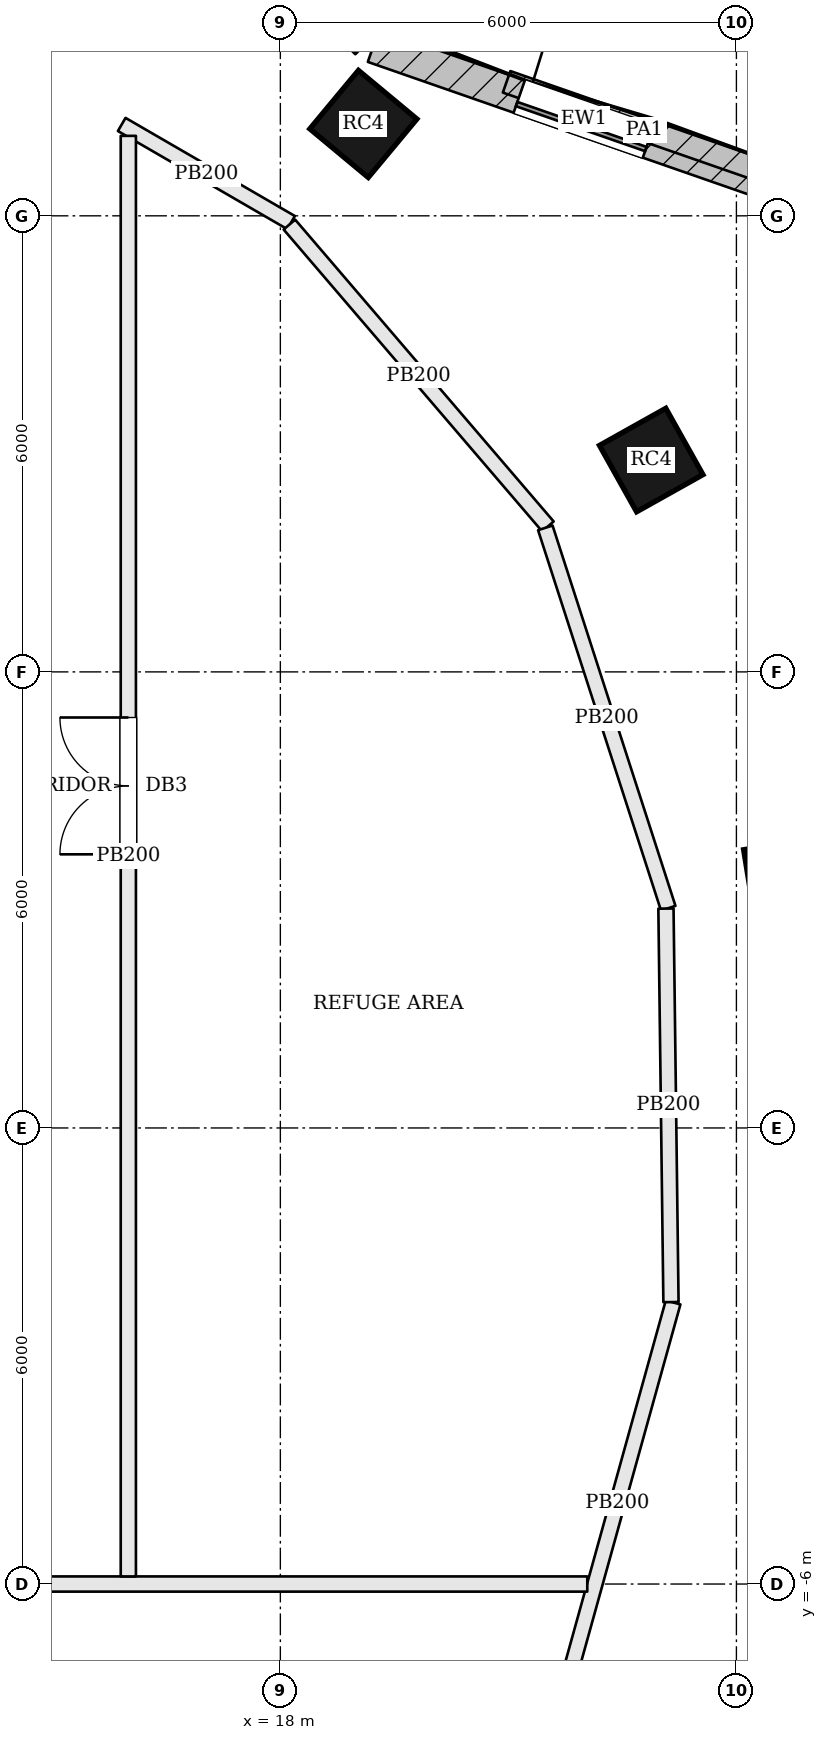
"""IFC4 building model, lengths in metres.
Left out: names, types, materials, properties, quantities, classifications, styles, units other than length and angle.
Written with IfcOpenShell. Run it as: python <this file> out.ifc"""

import sys

from ifc_helpers import new_model, si_unit, direction, frame, frame_2d, origin, origin_2d, place, context, subcontext, project, spatial, rectangle, extrude, element, fill, save


model = new_model("IFC4")
c1 = context("Model", 3, precision=1e-05, world=origin(), true_north=direction((0.0, 1.0)))
c2 = subcontext(c1, "Body", "Model", "MODEL_VIEW")
j1 = project(units=[si_unit("LENGTHUNIT", "METRE"), si_unit("PLANEANGLEUNIT", "RADIAN")], contexts=[c1])
p1 = place(None, origin())
s1 = spatial("IfcSite", under=j1, at=p1, CompositionType="ELEMENT")
p2 = place(p1, origin())
s2 = spatial("IfcBuilding", under=s1, at=p2, CompositionType="ELEMENT")
p3 = place(p2, frame((0.0, 0.0, 240.9)))
s3 = spatial("IfcBuildingStorey", under=s2, at=p3, CompositionType="ELEMENT", Elevation=240.9)
for number, where, z_axis, x_axis in (
    (1, (24.669, 3.248, 0.0), (0.0, 0.0, 1.0), (-0.162, 0.987, 0.0)),
    (2, (22.879, 8.787, 0.0), (0.0, 0.0, 1.0), (-0.489, 0.873, 0.0)),
    (3, (19.092, 13.209, 0.0), (0.0, 0.0, 1.0), (-0.769, 0.639, 0.0)),
):
    element("IfcColumn", number, at=place(p3, frame(where, z_axis=z_axis, x_axis=x_axis)), inside=s3, PredefinedType="COLUMN", context=c2, shape_type="SweptSolid", body=[
        extrude(rectangle(XDim=1.0, YDim=1.0, at=origin_2d()), origin(), (0.0, 0.0, 1.0), 3.9),
    ])
p4 = place(p3, frame((24.761, 12.31, 0.0), z_axis=(0.0, 0.0, 1.0), x_axis=(-0.944397305248, 0.328806523414, 0.0)))
e4 = element("IfcWall", 4, at=p4, inside=s3, PredefinedType="SOLIDWALL", context=c2, shape_type="SweptSolid", body=[
    extrude(rectangle(XDim=5.862, YDim=0.45, at=frame_2d((2.931, 0.0))), origin(), (0.0, 0.0, 1.0), 3.7),
])
p5 = place(p4, frame((2.031, 0.0, 0.9)))
e5 = element("IfcOpeningElement", 5, at=p5, cuts=e4, PredefinedType="OPENING", context=c2, shape_type="SweptSolid", body=[
    extrude(rectangle(XDim=1.8, YDim=2.3, at=frame_2d((0.9, 1.15))), frame((0.0, 0.235, 0.0), z_axis=(0.0, -1.0, 0.0), x_axis=(1.0, 0.0, 0.0)), (0.0, 0.0, 1.0), 0.47),
])
p6 = place(p3, frame((19.145, 14.285, 0.0), z_axis=(0.0, 0.0, 1.0), x_axis=(-0.707427521052, 0.706785895769, 0.0)))
e6 = element("IfcWall", 6, at=p6, inside=s3, PredefinedType="SOLIDWALL", context=c2, shape_type="SweptSolid", body=[
    extrude(rectangle(XDim=3.425, YDim=0.45, at=frame_2d((1.712, 0.0))), origin(), (0.0, 0.0, 1.0), 3.7),
])
p7 = place(p6, frame((0.662, 0.0, 0.9)))
e7 = element("IfcOpeningElement", 7, at=p7, cuts=e6, PredefinedType="OPENING", context=c2, shape_type="SweptSolid", body=[
    extrude(rectangle(XDim=2.1, YDim=2.3, at=frame_2d((1.05, 1.15))), frame((0.0, 0.235, 0.0), z_axis=(0.0, -1.0, 0.0), x_axis=(1.0, 0.0, 0.0)), (0.0, 0.0, 1.0), 0.47),
])
p8 = place(p3, frame((24.605, 12.5, 3.9), z_axis=(0.0, 0.0, 1.0), x_axis=(-0.944373295981, 0.328875474668, 0.0)))
e8 = element("IfcWall", 8, at=p8, inside=s3, PredefinedType="PARAPET", context=c2, shape_type="SweptSolid", body=[
    extrude(rectangle(XDim=3.842, YDim=0.3, at=frame_2d((1.921, 0.0))), origin(), (0.0, 0.0, 1.0), 1.1),
])
p9 = place(p3, frame((23.167, -2.295, 0.0), z_axis=(0.0, 0.0, 1.0), x_axis=(-0.267604764515, -0.963528769684, 0.0)))
e9 = element("IfcWall", 9, at=p9, inside=s3, PredefinedType="PARTITIONING", context=c2, shape_type="SweptSolid", body=[
    extrude(rectangle(XDim=5.475, YDim=0.2, at=frame_2d((2.737, 0.0))), origin(), (0.0, 0.0, 1.0), 3.7),
])
p10 = place(p3, frame((-21.998, -6.0, 0.0), z_axis=(0.0, 0.0, 1.0), x_axis=(1.0, 0.0, 0.0)))
e10 = element("IfcWall", 10, at=p10, inside=s3, PredefinedType="PARTITIONING", context=c2, shape_type="SweptSolid", body=[
    extrude(rectangle(XDim=44.036, YDim=0.2, at=frame_2d((22.018, 0.0))), origin(), (0.0, 0.0, 1.0), 3.7),
])
p11 = place(p10, frame((21.098, 0.0, 0.0)))
e11 = element("IfcOpeningElement", 11, at=p11, cuts=e10, PredefinedType="OPENING", context=c2, shape_type="SweptSolid", body=[
    extrude(rectangle(XDim=1.8, YDim=2.1, at=frame_2d((0.9, 1.05))), frame((0.0, 0.11, 0.0), z_axis=(0.0, -1.0, 0.0), x_axis=(1.0, 0.0, 0.0)), (0.0, 0.0, 1.0), 0.22),
])
p12 = place(p3, frame((15.913, 13.202, 0.0), z_axis=(0.0, 0.0, 1.0), x_axis=(0.86524014554, -0.501357647339, 0.0)))
e12 = element("IfcWall", 12, at=p12, inside=s3, PredefinedType="PARTITIONING", context=c2, shape_type="SweptSolid", body=[
    extrude(rectangle(XDim=2.575, YDim=0.2, at=frame_2d((1.288, 0.0))), origin(), (0.0, 0.0, 1.0), 3.7),
])
p13 = place(p3, frame((18.119, 11.885, 0.0), z_axis=(0.0, 0.0, 1.0), x_axis=(0.650510608515, -0.759497168006, 0.0)))
e13 = element("IfcWall", 13, at=p13, inside=s3, PredefinedType="PARTITIONING", context=c2, shape_type="SweptSolid", body=[
    extrude(rectangle(XDim=5.228, YDim=0.2, at=frame_2d((2.614, 0.0))), origin(), (0.0, 0.0, 1.0), 3.7),
])
p14 = place(p3, frame((21.486, 7.895, 0.0), z_axis=(0.0, 0.0, 1.0), x_axis=(0.307481575482, -0.951554034587, 0.0)))
e14 = element("IfcWall", 14, at=p14, inside=s3, PredefinedType="PARTITIONING", context=c2, shape_type="SweptSolid", body=[
    extrude(rectangle(XDim=5.259, YDim=0.2, at=frame_2d((2.629, 0.0))), origin(), (0.0, 0.0, 1.0), 3.7),
])
p15 = place(p3, frame((23.073, 2.886, 0.0), z_axis=(0.0, 0.0, 1.0), x_axis=(0.012731813994, -0.999918947171, 0.0)))
e15 = element("IfcWall", 15, at=p15, inside=s3, PredefinedType="PARTITIONING", context=c2, shape_type="SweptSolid", body=[
    extrude(rectangle(XDim=5.177, YDim=0.2, at=frame_2d((2.589, 0.0))), origin(), (0.0, 0.0, 1.0), 3.7),
])
p16 = place(p3, frame((16.0, -5.9, 0.0), z_axis=(0.0, 0.0, 1.0), x_axis=(0.0, 1.0, 0.0)))
e16 = element("IfcWall", 16, at=p16, inside=s3, PredefinedType="PARTITIONING", context=c2, shape_type="SweptSolid", body=[
    extrude(rectangle(XDim=18.952, YDim=0.2, at=frame_2d((9.476, 0.0))), origin(), (0.0, 0.0, 1.0), 3.7),
])
p17 = place(p16, frame((9.5, 0.0, 0.0)))
e17 = element("IfcOpeningElement", 17, at=p17, cuts=e16, PredefinedType="OPENING", context=c2, shape_type="SweptSolid", body=[
    extrude(rectangle(XDim=1.8, YDim=2.1, at=frame_2d((0.9, 1.05))), frame((0.0, 0.11, 0.0), z_axis=(0.0, -1.0, 0.0), x_axis=(1.0, 0.0, 0.0)), (0.0, 0.0, 1.0), 0.22),
])
p18 = place(p5, origin())
e18 = element("IfcWindow", 18, at=p18, inside=s3, PartitioningType="SINGLE_PANEL", PredefinedType="WINDOW", context=c2, shape_type="SweptSolid", body=[
    extrude(rectangle(XDim=1.8, YDim=2.3, at=frame_2d((0.9, 1.15))), frame((0.0, 0.135, 0.0), z_axis=(0.0, -1.0, 0.0), x_axis=(1.0, 0.0, 0.0)), (0.0, 0.0, 1.0), 0.06),
])
fill(e5, e18)
p19 = place(p17, origin())
e19 = element("IfcDoor", 19, at=p19, inside=s3, OperationType="DOUBLE_DOOR_SINGLE_SWING", PredefinedType="DOOR", context=c2, shape_type="SweptSolid", body=[
    extrude(rectangle(XDim=1.8, YDim=2.1, at=frame_2d((0.9, 1.05))), frame((0.0, 0.025, 0.0), z_axis=(0.0, -1.0, 0.0), x_axis=(1.0, 0.0, 0.0)), (0.0, 0.0, 1.0), 0.05),
])
fill(e17, e19)
save(model, sys.argv[1])
